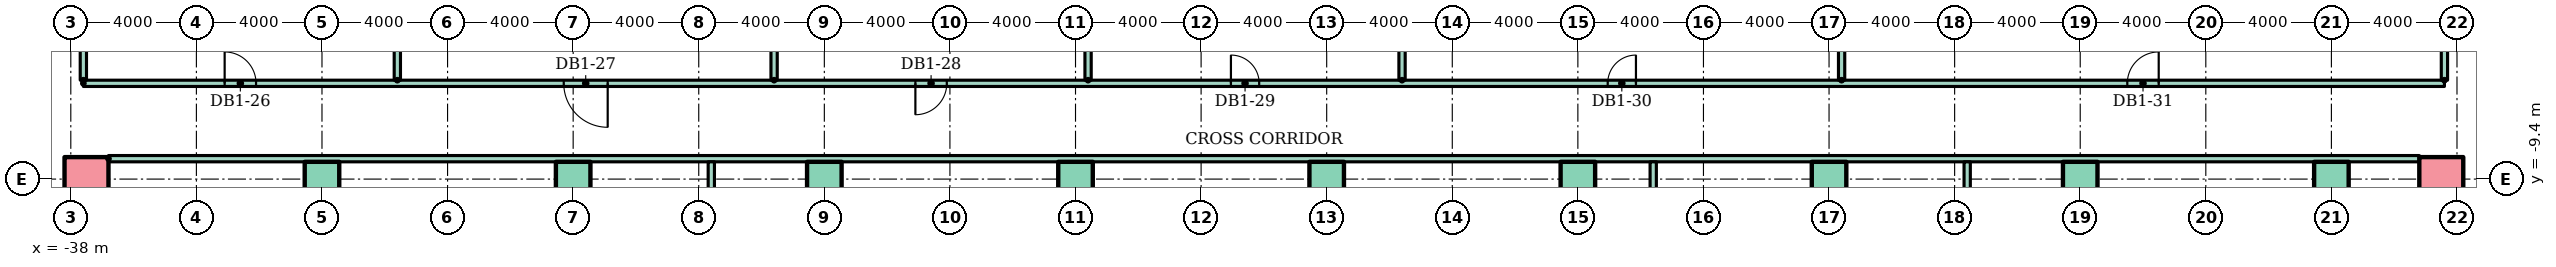
"""IFC4 building model, lengths in metres.
Left out: names, types, materials, properties, quantities, classifications, styles, units other than length and angle.
Written with IfcOpenShell. Run it as: python <this file> out.ifc"""

import sys

from ifc_helpers import new_model, si_unit, direction, frame, frame_2d, origin, origin_2d, place, context, subcontext, project, spatial, rectangle, hollow_rectangle, extrude, element, fill, save


model = new_model("IFC4")
c1 = context("Model", 3, precision=1e-05, world=origin(), true_north=direction((0.0, 1.0)))
c2 = subcontext(c1, "Body", "Model", "MODEL_VIEW")
j1 = project(units=[si_unit("LENGTHUNIT", "METRE"), si_unit("PLANEANGLEUNIT", "RADIAN")], contexts=[c1])
p1 = place(None, origin())
s1 = spatial("IfcSite", under=j1, at=p1, CompositionType="ELEMENT")
p2 = place(p1, origin())
s2 = spatial("IfcBuilding", under=s1, at=p2, CompositionType="ELEMENT")
p3 = place(p2, frame((0.0, 0.0, -5.0)))
s3 = spatial("IfcBuildingStorey", under=s2, at=p3, CompositionType="ELEMENT", Elevation=-5.0)
p4 = place(p3, frame((-37.5, -9.4, 0.0)))
e1 = element("IfcColumn", 1, at=p4, inside=s3, PredefinedType="COLUMN", context=c2, shape_type="SweptSolid", body=[
    extrude(hollow_rectangle(XDim=1.4, YDim=1.4, WallThickness=0.08, at=origin_2d()), origin(), (0.0, 0.0, 1.0), 5.0),
])
for number, where in (
    (2, (-30.0, -9.4, 0.0)),
    (3, (-22.0, -9.4, 0.0)),
    (4, (-14.0, -9.4, 0.0)),
    (5, (-6.0, -9.4, 0.0)),
    (6, (2.0, -9.4, 0.0)),
    (7, (10.0, -9.4, 0.0)),
    (8, (18.0, -9.4, 0.0)),
    (9, (26.0, -9.4, 0.0)),
    (10, (34.0, -9.4, 0.0)),
):
    element("IfcColumn", number, at=place(p3, frame(where)), inside=s3, PredefinedType="COLUMN", context=c2, shape_type="SweptSolid", body=[
        extrude(rectangle(XDim=1.1, YDim=1.1, at=origin_2d()), origin(), (0.0, 0.0, 1.0), 5.0),
    ])
p5 = place(p3, frame((37.5, -9.4, 0.0)))
e11 = element("IfcColumn", 11, at=p5, inside=s3, PredefinedType="COLUMN", context=c2, shape_type="SweptSolid", body=[
    extrude(hollow_rectangle(XDim=1.4, YDim=1.4, WallThickness=0.08, at=origin_2d()), origin(), (0.0, 0.0, 1.0), 5.0),
])
p6 = place(p3, frame((-36.8, -8.75, 0.0)))
e12 = element("IfcWall", 12, at=p6, inside=s3, PredefinedType="PARTITIONING", context=c2, shape_type="SweptSolid", body=[
    extrude(rectangle(XDim=73.6, YDim=0.2, at=frame_2d((36.8, 0.0))), origin(), (0.0, 0.0, 1.0), 4.58),
])
p7 = place(p3, frame((-37.6, -6.35, 0.0)))
e13 = element("IfcWall", 13, at=p7, inside=s3, PredefinedType="PARTITIONING", context=c2, shape_type="SweptSolid", body=[
    extrude(rectangle(XDim=75.2, YDim=0.2, at=frame_2d((37.6, 0.0))), origin(), (0.0, 0.0, 1.0), 4.58),
])
p8 = place(p7, frame((4.5, 0.0, 0.0)))
e14 = element("IfcOpeningElement", 14, at=p8, cuts=e13, PredefinedType="OPENING", context=c2, shape_type="SweptSolid", body=[
    extrude(rectangle(XDim=1.0, YDim=2.1, at=frame_2d((0.5, 1.05))), frame((0.0, 0.11, 0.0), z_axis=(0.0, -1.0, 0.0), x_axis=(1.0, 0.0, 0.0)), (0.0, 0.0, 1.0), 0.22),
])
p9 = place(p7, frame((15.3, 0.0, 0.0)))
e15 = element("IfcOpeningElement", 15, at=p9, cuts=e13, PredefinedType="OPENING", context=c2, shape_type="SweptSolid", body=[
    extrude(rectangle(XDim=1.4, YDim=2.1, at=frame_2d((0.7, 1.05))), frame((0.0, 0.11, 0.0), z_axis=(0.0, -1.0, 0.0), x_axis=(1.0, 0.0, 0.0)), (0.0, 0.0, 1.0), 0.22),
])
p10 = place(p7, frame((26.5, 0.0, 0.0)))
e16 = element("IfcOpeningElement", 16, at=p10, cuts=e13, PredefinedType="OPENING", context=c2, shape_type="SweptSolid", body=[
    extrude(rectangle(XDim=1.0, YDim=2.1, at=frame_2d((0.5, 1.05))), frame((0.0, 0.11, 0.0), z_axis=(0.0, -1.0, 0.0), x_axis=(1.0, 0.0, 0.0)), (0.0, 0.0, 1.0), 0.22),
])
p11 = place(p7, frame((36.55, 0.0, 0.0)))
e17 = element("IfcOpeningElement", 17, at=p11, cuts=e13, PredefinedType="OPENING", context=c2, shape_type="SweptSolid", body=[
    extrude(rectangle(XDim=0.9, YDim=2.1, at=frame_2d((0.45, 1.05))), frame((0.0, 0.11, 0.0), z_axis=(0.0, -1.0, 0.0), x_axis=(1.0, 0.0, 0.0)), (0.0, 0.0, 1.0), 0.22),
])
p12 = place(p7, frame((48.55, 0.0, 0.0)))
e18 = element("IfcOpeningElement", 18, at=p12, cuts=e13, PredefinedType="OPENING", context=c2, shape_type="SweptSolid", body=[
    extrude(rectangle(XDim=0.9, YDim=2.1, at=frame_2d((0.45, 1.05))), frame((0.0, 0.11, 0.0), z_axis=(0.0, -1.0, 0.0), x_axis=(1.0, 0.0, 0.0)), (0.0, 0.0, 1.0), 0.22),
])
p13 = place(p7, frame((65.1, 0.0, 0.0)))
e19 = element("IfcOpeningElement", 19, at=p13, cuts=e13, PredefinedType="OPENING", context=c2, shape_type="SweptSolid", body=[
    extrude(rectangle(XDim=1.0, YDim=2.1, at=frame_2d((0.5, 1.05))), frame((0.0, 0.11, 0.0), z_axis=(0.0, -1.0, 0.0), x_axis=(1.0, 0.0, 0.0)), (0.0, 0.0, 1.0), 0.22),
])
p14 = place(p3, frame((-37.6, -6.25, 0.0), z_axis=(0.0, 0.0, 1.0), x_axis=(0.0, 1.0, 0.0)))
e20 = element("IfcWall", 20, at=p14, inside=s3, PredefinedType="PARTITIONING", context=c2, shape_type="SweptSolid", body=[
    extrude(rectangle(XDim=3.55, YDim=0.2, at=frame_2d((1.775, 0.0))), origin(), (0.0, 0.0, 1.0), 4.58),
])
p15 = place(p3, frame((-27.6, -6.25, 0.0), z_axis=(0.0, 0.0, 1.0), x_axis=(0.0, 1.0, 0.0)))
e21 = element("IfcWall", 21, at=p15, inside=s3, PredefinedType="PARTITIONING", context=c2, shape_type="SweptSolid", body=[
    extrude(rectangle(XDim=4.75, YDim=0.2, at=frame_2d((2.375, 0.0))), origin(), (0.0, 0.0, 1.0), 4.58),
])
p16 = place(p3, frame((-17.6, -19.5, 0.0), z_axis=(0.0, 0.0, 1.0), x_axis=(0.0, 1.0, 0.0)))
e22 = element("IfcWall", 22, at=p16, inside=s3, PredefinedType="PARTITIONING", context=c2, shape_type="SweptSolid", body=[
    extrude(rectangle(XDim=10.65, YDim=0.2, at=frame_2d((5.325, 0.0))), origin(), (0.0, 0.0, 1.0), 4.58),
])
p17 = place(p3, frame((-15.6, -6.25, 0.0), z_axis=(0.0, 0.0, 1.0), x_axis=(0.0, 1.0, 0.0)))
e23 = element("IfcWall", 23, at=p17, inside=s3, PredefinedType="PARTITIONING", context=c2, shape_type="SweptSolid", body=[
    extrude(rectangle(XDim=4.75, YDim=0.2, at=frame_2d((2.375, 0.0))), origin(), (0.0, 0.0, 1.0), 4.58),
])
p18 = place(p3, frame((-5.6, -6.25, 0.0), z_axis=(0.0, 0.0, 1.0), x_axis=(0.0, 1.0, 0.0)))
e24 = element("IfcWall", 24, at=p18, inside=s3, PredefinedType="PARTITIONING", context=c2, shape_type="SweptSolid", body=[
    extrude(rectangle(XDim=3.7, YDim=0.2, at=frame_2d((1.85, 0.0))), origin(), (0.0, 0.0, 1.0), 4.58),
])
p19 = place(p3, frame((4.4, -6.25, 0.0), z_axis=(0.0, 0.0, 1.0), x_axis=(0.0, 1.0, 0.0)))
e25 = element("IfcWall", 25, at=p19, inside=s3, PredefinedType="PARTITIONING", context=c2, shape_type="SweptSolid", body=[
    extrude(rectangle(XDim=4.85, YDim=0.2, at=frame_2d((2.425, 0.0))), origin(), (0.0, 0.0, 1.0), 4.58),
])
p20 = place(p3, frame((12.4, -19.5, 0.0), z_axis=(0.0, 0.0, 1.0), x_axis=(0.0, 1.0, 0.0)))
e26 = element("IfcWall", 26, at=p20, inside=s3, PredefinedType="PARTITIONING", context=c2, shape_type="SweptSolid", body=[
    extrude(rectangle(XDim=10.65, YDim=0.2, at=frame_2d((5.325, 0.0))), origin(), (0.0, 0.0, 1.0), 4.58),
])
p21 = place(p3, frame((18.4, -6.25, 0.0), z_axis=(0.0, 0.0, 1.0), x_axis=(0.0, 1.0, 0.0)))
e27 = element("IfcWall", 27, at=p21, inside=s3, PredefinedType="PARTITIONING", context=c2, shape_type="SweptSolid", body=[
    extrude(rectangle(XDim=3.7, YDim=0.2, at=frame_2d((1.85, 0.0))), origin(), (0.0, 0.0, 1.0), 4.58),
])
p22 = place(p3, frame((22.4, -19.5, 0.0), z_axis=(0.0, 0.0, 1.0), x_axis=(0.0, 1.0, 0.0)))
e28 = element("IfcWall", 28, at=p22, inside=s3, PredefinedType="PARTITIONING", context=c2, shape_type="SweptSolid", body=[
    extrude(rectangle(XDim=10.65, YDim=0.2, at=frame_2d((5.325, 0.0))), origin(), (0.0, 0.0, 1.0), 4.58),
])
p23 = place(p3, frame((37.6, -6.25, 0.0), z_axis=(0.0, 0.0, 1.0), x_axis=(0.0, 1.0, 0.0)))
e29 = element("IfcWall", 29, at=p23, inside=s3, PredefinedType="PARTITIONING", context=c2, shape_type="SweptSolid", body=[
    extrude(rectangle(XDim=3.55, YDim=0.2, at=frame_2d((1.775, 0.0))), origin(), (0.0, 0.0, 1.0), 4.58),
])
p24 = place(p8, origin())
e30 = element("IfcDoor", 30, at=p24, inside=s3, OperationType="SINGLE_SWING_LEFT", PredefinedType="DOOR", context=c2, shape_type="SweptSolid", body=[
    extrude(rectangle(XDim=1.0, YDim=2.1, at=frame_2d((0.5, 1.05))), frame((0.0, 0.025, 0.0), z_axis=(0.0, -1.0, 0.0), x_axis=(1.0, 0.0, 0.0)), (0.0, 0.0, 1.0), 0.05),
])
fill(e14, e30)
p25 = place(p9, frame((1.4, 0.0, 0.0), z_axis=(0.0, 0.0, 1.0), x_axis=(-1.0, 0.0, 0.0)))
e31 = element("IfcDoor", 31, at=p25, inside=s3, OperationType="DOUBLE_DOOR_SINGLE_SWING", PredefinedType="DOOR", context=c2, shape_type="SweptSolid", body=[
    extrude(rectangle(XDim=1.4, YDim=2.1, at=frame_2d((0.7, 1.05))), frame((0.0, 0.025, 0.0), z_axis=(0.0, -1.0, 0.0), x_axis=(1.0, 0.0, 0.0)), (0.0, 0.0, 1.0), 0.05),
])
fill(e15, e31)
p26 = place(p10, frame((1.0, 0.0, 0.0), z_axis=(0.0, 0.0, 1.0), x_axis=(-1.0, 0.0, 0.0)))
e32 = element("IfcDoor", 32, at=p26, inside=s3, OperationType="SINGLE_SWING_LEFT", PredefinedType="DOOR", context=c2, shape_type="SweptSolid", body=[
    extrude(rectangle(XDim=1.0, YDim=2.1, at=frame_2d((0.5, 1.05))), frame((0.0, 0.025, 0.0), z_axis=(0.0, -1.0, 0.0), x_axis=(1.0, 0.0, 0.0)), (0.0, 0.0, 1.0), 0.05),
])
fill(e16, e32)
p27 = place(p11, origin())
e33 = element("IfcDoor", 33, at=p27, inside=s3, OperationType="SINGLE_SWING_LEFT", PredefinedType="DOOR", context=c2, shape_type="SweptSolid", body=[
    extrude(rectangle(XDim=0.9, YDim=2.1, at=frame_2d((0.45, 1.05))), frame((0.0, 0.025, 0.0), z_axis=(0.0, -1.0, 0.0), x_axis=(1.0, 0.0, 0.0)), (0.0, 0.0, 1.0), 0.05),
])
fill(e17, e33)
p28 = place(p12, origin())
e34 = element("IfcDoor", 34, at=p28, inside=s3, OperationType="SINGLE_SWING_RIGHT", PredefinedType="DOOR", context=c2, shape_type="SweptSolid", body=[
    extrude(rectangle(XDim=0.9, YDim=2.1, at=frame_2d((0.45, 1.05))), frame((0.0, 0.025, 0.0), z_axis=(0.0, -1.0, 0.0), x_axis=(1.0, 0.0, 0.0)), (0.0, 0.0, 1.0), 0.05),
])
fill(e18, e34)
p29 = place(p13, origin())
e35 = element("IfcDoor", 35, at=p29, inside=s3, OperationType="SINGLE_SWING_RIGHT", PredefinedType="DOOR", context=c2, shape_type="SweptSolid", body=[
    extrude(rectangle(XDim=1.0, YDim=2.1, at=frame_2d((0.5, 1.05))), frame((0.0, 0.025, 0.0), z_axis=(0.0, -1.0, 0.0), x_axis=(1.0, 0.0, 0.0)), (0.0, 0.0, 1.0), 0.05),
])
fill(e19, e35)
save(model, sys.argv[1])
